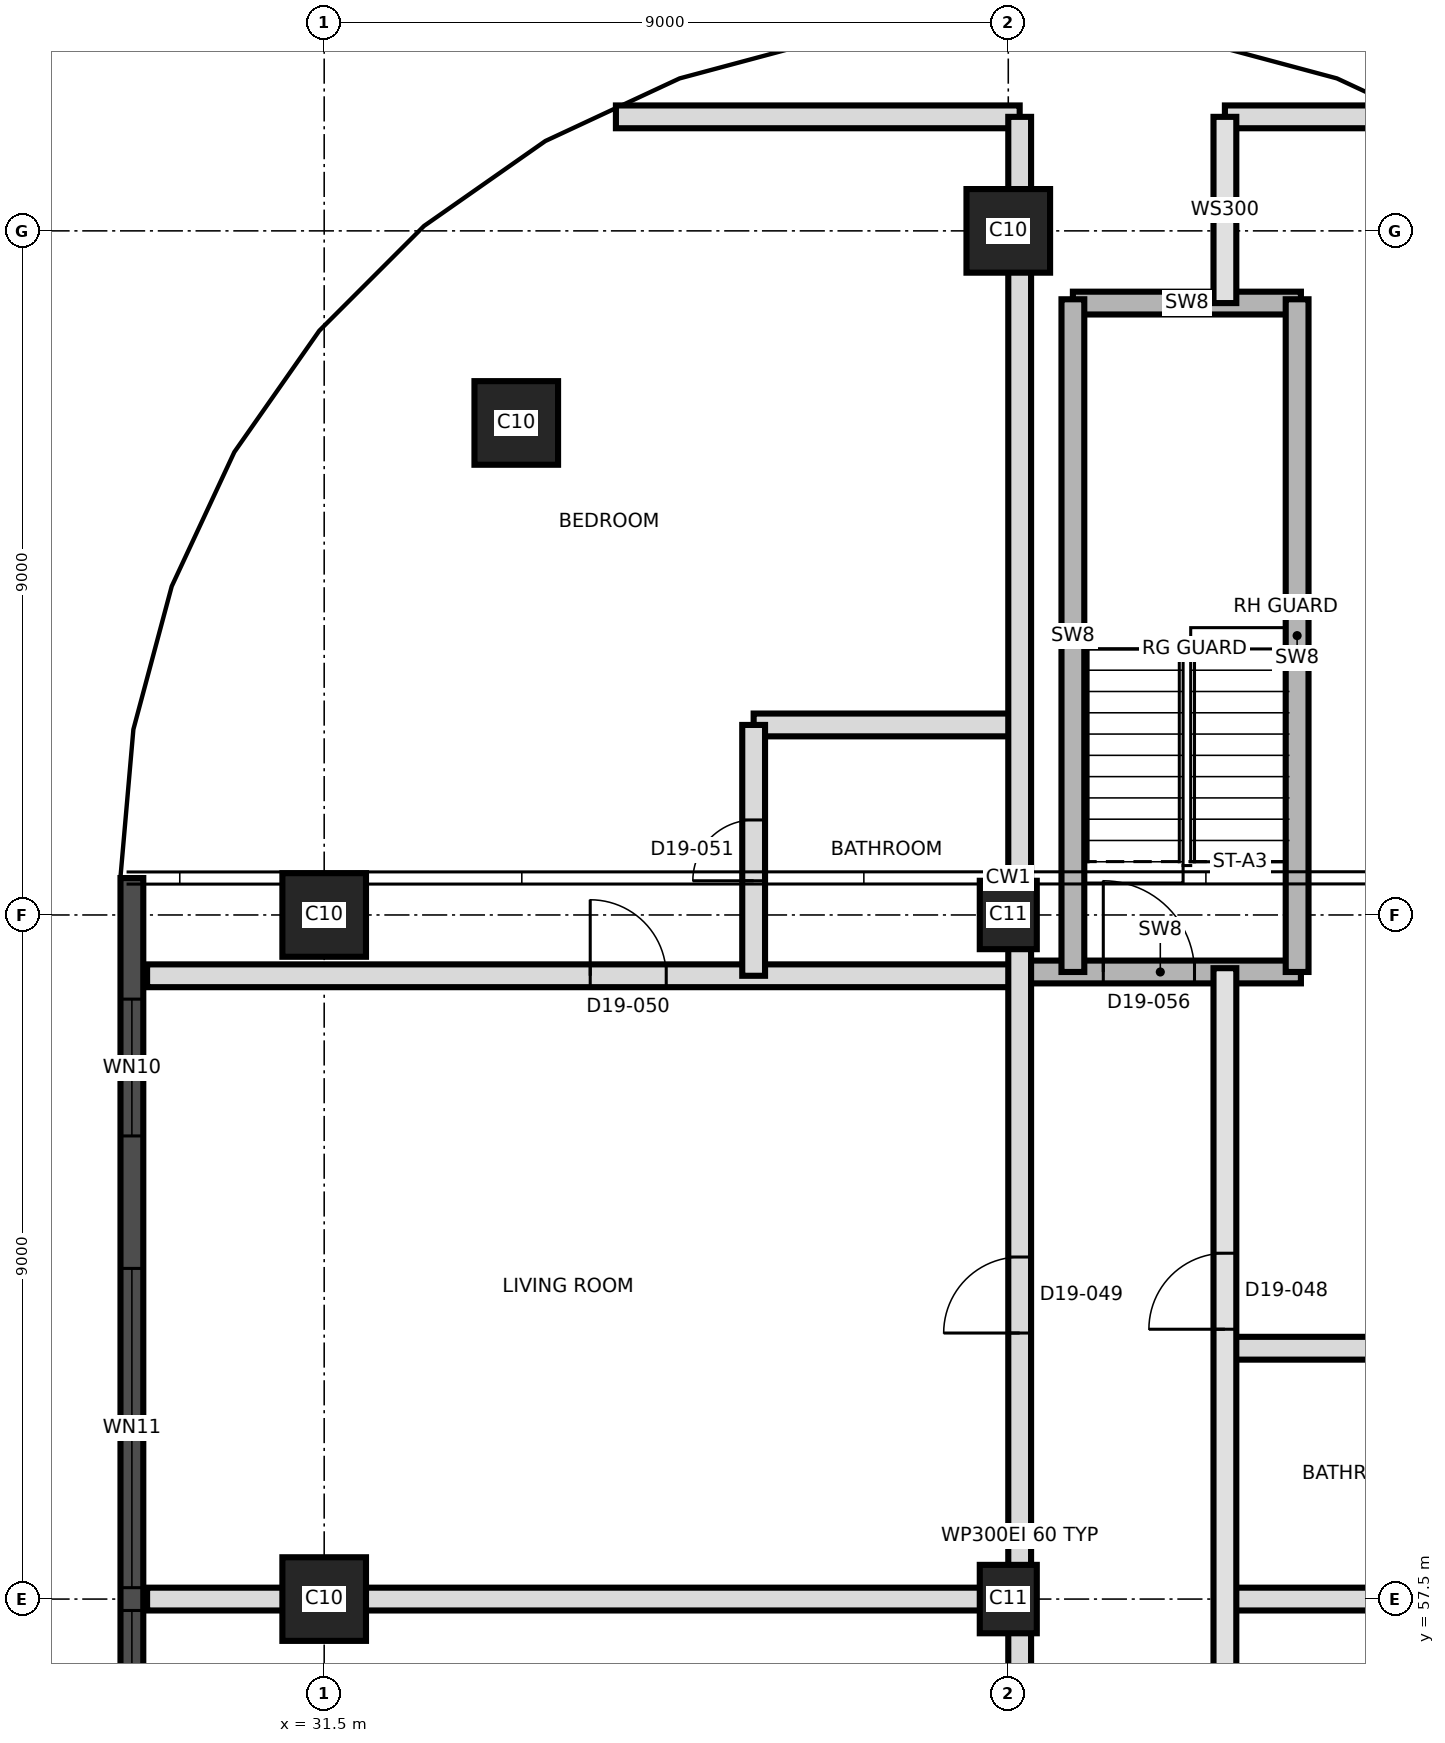
"""IFC4 building model, lengths in metres.
Left out: names, types, materials, properties, quantities, classifications, styles, units other than length and angle.
Written with IfcOpenShell. Run it as: python <this file> out.ifc"""

import sys

from ifc_helpers import new_model, si_unit, direction, frame, frame_2d, origin, origin_2d, place, context, subcontext, project, spatial, rectangle, extrude, element, fill, save


model = new_model("IFC4")
c1 = context("Model", 3, precision=1e-05, world=origin(), true_north=direction((0.0, 1.0)))
c2 = subcontext(c1, "Body", "Model", "MODEL_VIEW")
j1 = project(units=[si_unit("LENGTHUNIT", "METRE"), si_unit("PLANEANGLEUNIT", "RADIAN")], contexts=[c1])
p1 = place(None, origin())
s1 = spatial("IfcSite", under=j1, at=p1, CompositionType="ELEMENT")
p2 = place(p1, origin())
s2 = spatial("IfcBuilding", under=s1, at=p2, CompositionType="ELEMENT")
p3 = place(p2, frame((0.0, 0.0, 179.2)))
s3 = spatial("IfcBuildingStorey", under=s2, at=p3, CompositionType="ELEMENT", Elevation=179.2)
p4 = place(p3, frame((31.5, 57.5, 0.0), z_axis=(0.0, 0.0, 1.0), x_axis=(1.0, 0.0, 0.0)))
e1 = element("IfcColumn", 1, at=p4, inside=s3, PredefinedType="COLUMN", context=c2, shape_type="SweptSolid", body=[
    extrude(rectangle(XDim=1.1, YDim=1.1, at=origin_2d()), origin(), (0.0, 0.0, 1.0), 3.7),
])
p5 = place(p3, frame((40.5, 57.5, 0.0), z_axis=(0.0, 0.0, 1.0), x_axis=(0.0, 1.0, 0.0)))
e2 = element("IfcColumn", 2, at=p5, inside=s3, PredefinedType="COLUMN", context=c2, shape_type="SweptSolid", body=[
    extrude(rectangle(XDim=0.9, YDim=0.75, at=origin_2d()), origin(), (0.0, 0.0, 1.0), 3.7),
])
p6 = place(p3, frame((31.5, 66.5, 0.0), z_axis=(0.0, 0.0, 1.0), x_axis=(1.0, 0.0, 0.0)))
e3 = element("IfcColumn", 3, at=p6, inside=s3, PredefinedType="COLUMN", context=c2, shape_type="SweptSolid", body=[
    extrude(rectangle(XDim=1.1, YDim=1.1, at=origin_2d()), origin(), (0.0, 0.0, 1.0), 3.7),
])
p7 = place(p3, frame((40.5, 66.5, 0.0), z_axis=(0.0, 0.0, 1.0), x_axis=(0.0, 1.0, 0.0)))
e4 = element("IfcColumn", 4, at=p7, inside=s3, PredefinedType="COLUMN", context=c2, shape_type="SweptSolid", body=[
    extrude(rectangle(XDim=0.9, YDim=0.75, at=origin_2d()), origin(), (0.0, 0.0, 1.0), 3.7),
])
for number, where, z_axis, x_axis in (
    (5, (34.027, 72.973, 0.0), (0.0, 0.0, 1.0), (1.0, 0.0, 0.0)),
    (6, (40.5, 75.5, 0.0), (0.0, 0.0, 1.0), (1.0, 0.0, 0.0)),
):
    element("IfcColumn", number, at=place(p3, frame(where, z_axis=z_axis, x_axis=x_axis)), inside=s3, PredefinedType="COLUMN", context=c2, shape_type="SweptSolid", body=[
        extrude(rectangle(XDim=1.1, YDim=1.1, at=origin_2d()), origin(), (0.0, 0.0, 1.0), 3.7),
    ])
p8 = place(p3, frame((28.97, 66.986, 0.0), z_axis=(0.0, 0.0, 1.0), x_axis=(0.0, -1.0, 0.0)))
e7 = element("IfcWall", 7, at=p8, inside=s3, PredefinedType="SOLIDWALL", context=c2, shape_type="SweptSolid", body=[
    extrude(rectangle(XDim=32.976, YDim=0.3, at=frame_2d((16.488, 0.0))), origin(), (0.0, 0.0, 1.0), 3.4),
])
p9 = place(p8, frame((1.593, 0.0, 0.3)))
e8 = element("IfcOpeningElement", 8, at=p9, cuts=e7, PredefinedType="OPENING", context=c2, shape_type="SweptSolid", body=[
    extrude(rectangle(XDim=1.8, YDim=2.4, at=frame_2d((0.9, 1.2))), frame((0.0, 0.16, 0.0), z_axis=(0.0, -1.0, 0.0), x_axis=(1.0, 0.0, 0.0)), (0.0, 0.0, 1.0), 0.32),
])
p10 = place(p8, frame((5.136, 0.0, 0.9)))
e9 = element("IfcOpeningElement", 9, at=p10, cuts=e7, PredefinedType="OPENING", context=c2, shape_type="SweptSolid", body=[
    extrude(rectangle(XDim=4.2, YDim=1.5, at=frame_2d((2.1, 0.75))), frame((0.0, 0.16, 0.0), z_axis=(0.0, -1.0, 0.0), x_axis=(1.0, 0.0, 0.0)), (0.0, 0.0, 1.0), 0.32),
])
p11 = place(p8, frame((9.636, 0.0, 0.9)))
e10 = element("IfcOpeningElement", 10, at=p11, cuts=e7, PredefinedType="OPENING", context=c2, shape_type="SweptSolid", body=[
    extrude(rectangle(XDim=4.2, YDim=1.5, at=frame_2d((2.1, 0.75))), frame((0.0, 0.16, 0.0), z_axis=(0.0, -1.0, 0.0), x_axis=(1.0, 0.0, 0.0)), (0.0, 0.0, 1.0), 0.32),
])
p12 = place(p8, frame((14.136, 0.0, 0.9)))
e11 = element("IfcOpeningElement", 11, at=p12, cuts=e7, PredefinedType="OPENING", context=c2, shape_type="SweptSolid", body=[
    extrude(rectangle(XDim=4.2, YDim=1.5, at=frame_2d((2.1, 0.75))), frame((0.0, 0.16, 0.0), z_axis=(0.0, -1.0, 0.0), x_axis=(1.0, 0.0, 0.0)), (0.0, 0.0, 1.0), 0.32),
])
p13 = place(p8, frame((18.636, 0.0, 0.9)))
e12 = element("IfcOpeningElement", 12, at=p13, cuts=e7, PredefinedType="OPENING", context=c2, shape_type="SweptSolid", body=[
    extrude(rectangle(XDim=4.2, YDim=1.5, at=frame_2d((2.1, 0.75))), frame((0.0, 0.16, 0.0), z_axis=(0.0, -1.0, 0.0), x_axis=(1.0, 0.0, 0.0)), (0.0, 0.0, 1.0), 0.32),
])
p14 = place(p8, frame((23.136, 0.0, 0.9)))
e13 = element("IfcOpeningElement", 13, at=p14, cuts=e7, PredefinedType="OPENING", context=c2, shape_type="SweptSolid", body=[
    extrude(rectangle(XDim=4.2, YDim=1.5, at=frame_2d((2.1, 0.75))), frame((0.0, 0.16, 0.0), z_axis=(0.0, -1.0, 0.0), x_axis=(1.0, 0.0, 0.0)), (0.0, 0.0, 1.0), 0.32),
])
p15 = place(p8, frame((29.331, 0.0, 0.3)))
e14 = element("IfcOpeningElement", 14, at=p15, cuts=e7, PredefinedType="OPENING", context=c2, shape_type="SweptSolid", body=[
    extrude(rectangle(XDim=1.8, YDim=2.4, at=frame_2d((0.9, 1.2))), frame((0.0, 0.16, 0.0), z_axis=(0.0, -1.0, 0.0), x_axis=(1.0, 0.0, 0.0)), (0.0, 0.0, 1.0), 0.32),
])
p16 = place(p3, frame((29.17, 57.5, 0.0), z_axis=(0.0, 0.0, 1.0), x_axis=(1.0, 0.0, 0.0)))
e15 = element("IfcWall", 15, at=p16, inside=s3, PredefinedType="PARTITIONING", context=c2, shape_type="SweptSolid", body=[
    extrude(rectangle(XDim=11.48, YDim=0.3, at=frame_2d((5.74, 0.0))), origin(), (0.0, 0.0, 1.0), 3.4),
])
p17 = place(p3, frame((43.35, 57.5, 0.0), z_axis=(0.0, 0.0, 1.0), x_axis=(1.0, 0.0, 0.0)))
e16 = element("IfcWall", 16, at=p17, inside=s3, PredefinedType="PARTITIONING", context=c2, shape_type="SweptSolid", body=[
    extrude(rectangle(XDim=8.66, YDim=0.3, at=frame_2d((4.33, 0.0))), origin(), (0.0, 0.0, 1.0), 3.4),
])
p18 = place(p3, frame((43.35, 60.8, 0.0), z_axis=(0.0, 0.0, 1.0), x_axis=(1.0, 0.0, 0.0)))
e17 = element("IfcWall", 17, at=p18, inside=s3, PredefinedType="PARTITIONING", context=c2, shape_type="SweptSolid", body=[
    extrude(rectangle(XDim=3.5, YDim=0.3, at=frame_2d((1.75, 0.0))), origin(), (0.0, 0.0, 1.0), 3.4),
])
p19 = place(p3, frame((29.17, 65.7, 0.0), z_axis=(0.0, 0.0, 1.0), x_axis=(1.0, 0.0, 0.0)))
e18 = element("IfcWall", 18, at=p19, inside=s3, PredefinedType="PARTITIONING", context=c2, shape_type="SweptSolid", body=[
    extrude(rectangle(XDim=11.48, YDim=0.3, at=frame_2d((5.74, 0.0))), origin(), (0.0, 0.0, 1.0), 3.4),
])
p20 = place(p19, frame((5.83, 0.0, 0.0)))
e19 = element("IfcOpeningElement", 19, at=p20, cuts=e18, PredefinedType="OPENING", context=c2, shape_type="SweptSolid", body=[
    extrude(rectangle(XDim=1.0, YDim=2.1, at=frame_2d((0.5, 1.05))), frame((0.0, 0.16, 0.0), z_axis=(0.0, -1.0, 0.0), x_axis=(1.0, 0.0, 0.0)), (0.0, 0.0, 1.0), 0.32),
])
p21 = place(p3, frame((40.65, 65.75, 0.0), z_axis=(0.0, 0.0, 1.0), x_axis=(1.0, 0.0, 0.0)))
e20 = element("IfcWall", 20, at=p21, inside=s3, PredefinedType="SHEAR", context=c2, shape_type="SweptSolid", body=[
    extrude(rectangle(XDim=3.7, YDim=0.3, at=frame_2d((1.85, 0.0))), origin(), (0.0, 0.0, 1.0), 3.4),
])
p22 = place(p21, frame((1.1, 0.0, 0.0)))
e21 = element("IfcOpeningElement", 21, at=p22, cuts=e20, PredefinedType="OPENING", context=c2, shape_type="SweptSolid", body=[
    extrude(rectangle(XDim=1.2, YDim=2.1, at=frame_2d((0.6, 1.05))), frame((0.0, 0.16, 0.0), z_axis=(0.0, -1.0, 0.0), x_axis=(1.0, 0.0, 0.0)), (0.0, 0.0, 1.0), 0.32),
])
p23 = place(p3, frame((37.15, 69.0, 0.0), z_axis=(0.0, 0.0, 1.0), x_axis=(1.0, 0.0, 0.0)))
e22 = element("IfcWall", 22, at=p23, inside=s3, PredefinedType="PARTITIONING", context=c2, shape_type="SweptSolid", body=[
    extrude(rectangle(XDim=3.5, YDim=0.3, at=frame_2d((1.75, 0.0))), origin(), (0.0, 0.0, 1.0), 3.4),
])
p24 = place(p3, frame((41.35, 74.55, 0.0), z_axis=(0.0, 0.0, 1.0), x_axis=(1.0, 0.0, 0.0)))
e23 = element("IfcWall", 23, at=p24, inside=s3, PredefinedType="SHEAR", context=c2, shape_type="SweptSolid", body=[
    extrude(rectangle(XDim=3.0, YDim=0.3, at=frame_2d((1.5, 0.0))), origin(), (0.0, 0.0, 1.0), 3.4),
])
p25 = place(p3, frame((35.338, 77.0, 0.0), z_axis=(0.0, 0.0, 1.0), x_axis=(1.0, 0.0, 0.0)))
e24 = element("IfcWall", 24, at=p25, inside=s3, PredefinedType="PARTITIONING", context=c2, shape_type="SweptSolid", body=[
    extrude(rectangle(XDim=5.312, YDim=0.3, at=frame_2d((2.656, 0.0))), origin(), (0.0, 0.0, 1.0), 3.4),
])
p26 = place(p3, frame((43.35, 77.0, 0.0), z_axis=(0.0, 0.0, 1.0), x_axis=(1.0, 0.0, 0.0)))
e25 = element("IfcWall", 25, at=p26, inside=s3, PredefinedType="PARTITIONING", context=c2, shape_type="SweptSolid", body=[
    extrude(rectangle(XDim=2.312, YDim=0.3, at=frame_2d((1.156, 0.0))), origin(), (0.0, 0.0, 1.0), 3.4),
])
p27 = place(p3, frame((37.15, 65.7, 0.0), z_axis=(0.0, 0.0, 1.0), x_axis=(0.0, 1.0, 0.0)))
e26 = element("IfcWall", 26, at=p27, inside=s3, PredefinedType="PARTITIONING", context=c2, shape_type="SweptSolid", body=[
    extrude(rectangle(XDim=3.3, YDim=0.3, at=frame_2d((1.65, 0.0))), origin(), (0.0, 0.0, 1.0), 3.4),
])
p28 = place(p27, frame((1.25, 0.0, 0.0)))
e27 = element("IfcOpeningElement", 27, at=p28, cuts=e26, PredefinedType="OPENING", context=c2, shape_type="SweptSolid", body=[
    extrude(rectangle(XDim=0.8, YDim=2.1, at=frame_2d((0.4, 1.05))), frame((0.0, 0.16, 0.0), z_axis=(0.0, -1.0, 0.0), x_axis=(1.0, 0.0, 0.0)), (0.0, 0.0, 1.0), 0.32),
])
p29 = place(p3, frame((40.65, 39.65, 0.0), z_axis=(0.0, 0.0, 1.0), x_axis=(0.0, 1.0, 0.0)))
e28 = element("IfcWall", 28, at=p29, inside=s3, PredefinedType="PARTITIONING", context=c2, shape_type="SweptSolid", body=[
    extrude(rectangle(XDim=37.35, YDim=0.3, at=frame_2d((18.675, 0.0))), origin(), (0.0, 0.0, 1.0), 3.4),
])
p30 = place(p29, frame((0.88, 0.0, 0.0)))
e29 = element("IfcOpeningElement", 29, at=p30, cuts=e28, PredefinedType="OPENING", context=c2, shape_type="SweptSolid", body=[
    extrude(rectangle(XDim=1.0, YDim=2.1, at=frame_2d((0.5, 1.05))), frame((0.0, 0.16, 0.0), z_axis=(0.0, -1.0, 0.0), x_axis=(1.0, 0.0, 0.0)), (0.0, 0.0, 1.0), 0.32),
])
p31 = place(p29, frame((6.73, 0.0, 0.0)))
e30 = element("IfcOpeningElement", 30, at=p31, cuts=e28, PredefinedType="OPENING", context=c2, shape_type="SweptSolid", body=[
    extrude(rectangle(XDim=1.0, YDim=2.1, at=frame_2d((0.5, 1.05))), frame((0.0, 0.16, 0.0), z_axis=(0.0, -1.0, 0.0), x_axis=(1.0, 0.0, 0.0)), (0.0, 0.0, 1.0), 0.32),
])
p32 = place(p29, frame((12.265, 0.0, 0.0)))
e31 = element("IfcOpeningElement", 31, at=p32, cuts=e28, PredefinedType="OPENING", context=c2, shape_type="SweptSolid", body=[
    extrude(rectangle(XDim=1.0, YDim=2.1, at=frame_2d((0.5, 1.05))), frame((0.0, 0.16, 0.0), z_axis=(0.0, -1.0, 0.0), x_axis=(1.0, 0.0, 0.0)), (0.0, 0.0, 1.0), 0.32),
])
p33 = place(p29, frame((15.215, 0.0, 0.0)))
e32 = element("IfcOpeningElement", 32, at=p33, cuts=e28, PredefinedType="OPENING", context=c2, shape_type="SweptSolid", body=[
    extrude(rectangle(XDim=1.4, YDim=2.1, at=frame_2d((0.7, 1.05))), frame((0.0, 0.16, 0.0), z_axis=(0.0, -1.0, 0.0), x_axis=(1.0, 0.0, 0.0)), (0.0, 0.0, 1.0), 0.32),
])
p34 = place(p29, frame((21.35, 0.0, 0.0)))
e33 = element("IfcOpeningElement", 33, at=p34, cuts=e28, PredefinedType="OPENING", context=c2, shape_type="SweptSolid", body=[
    extrude(rectangle(XDim=1.0, YDim=2.4, at=frame_2d((0.5, 1.2))), frame((0.0, 0.16, 0.0), z_axis=(0.0, -1.0, 0.0), x_axis=(1.0, 0.0, 0.0)), (0.0, 0.0, 1.0), 0.32),
])
p35 = place(p3, frame((41.35, 65.75, 0.0), z_axis=(0.0, 0.0, 1.0), x_axis=(0.0, 1.0, 0.0)))
e34 = element("IfcWall", 34, at=p35, inside=s3, PredefinedType="SHEAR", context=c2, shape_type="SweptSolid", body=[
    extrude(rectangle(XDim=8.85, YDim=0.3, at=frame_2d((4.425, 0.0))), origin(), (0.0, 0.0, 1.0), 3.4),
])
p36 = place(p3, frame((43.35, 39.65, 0.0), z_axis=(0.0, 0.0, 1.0), x_axis=(0.0, 1.0, 0.0)))
e35 = element("IfcWall", 35, at=p36, inside=s3, PredefinedType="SOLIDWALL", context=c2, shape_type="SweptSolid", body=[
    extrude(rectangle(XDim=26.15, YDim=0.3, at=frame_2d((13.075, 0.0))), origin(), (0.0, 0.0, 1.0), 3.4),
])
p37 = place(p36, frame((3.265, 0.0, 0.0)))
e36 = element("IfcOpeningElement", 36, at=p37, cuts=e35, PredefinedType="OPENING", context=c2, shape_type="SweptSolid", body=[
    extrude(rectangle(XDim=1.0, YDim=2.1, at=frame_2d((0.5, 1.05))), frame((0.0, 0.16, 0.0), z_axis=(0.0, -1.0, 0.0), x_axis=(1.0, 0.0, 0.0)), (0.0, 0.0, 1.0), 0.32),
])
p38 = place(p36, frame((6.215, 0.0, 0.0)))
e37 = element("IfcOpeningElement", 37, at=p38, cuts=e35, PredefinedType="OPENING", context=c2, shape_type="SweptSolid", body=[
    extrude(rectangle(XDim=1.4, YDim=2.1, at=frame_2d((0.7, 1.05))), frame((0.0, 0.16, 0.0), z_axis=(0.0, -1.0, 0.0), x_axis=(1.0, 0.0, 0.0)), (0.0, 0.0, 1.0), 0.32),
])
p39 = place(p36, frame((9.985, 0.0, 0.0)))
e38 = element("IfcOpeningElement", 38, at=p39, cuts=e35, PredefinedType="OPENING", context=c2, shape_type="SweptSolid", body=[
    extrude(rectangle(XDim=1.2, YDim=2.1, at=frame_2d((0.6, 1.05))), frame((0.0, 0.16, 0.0), z_axis=(0.0, -1.0, 0.0), x_axis=(1.0, 0.0, 0.0)), (0.0, 0.0, 1.0), 0.32),
])
p40 = place(p36, frame((13.235, 0.0, 0.0)))
e39 = element("IfcOpeningElement", 39, at=p40, cuts=e35, PredefinedType="OPENING", context=c2, shape_type="SweptSolid", body=[
    extrude(rectangle(XDim=1.0, YDim=2.1, at=frame_2d((0.5, 1.05))), frame((0.0, 0.16, 0.0), z_axis=(0.0, -1.0, 0.0), x_axis=(1.0, 0.0, 0.0)), (0.0, 0.0, 1.0), 0.32),
])
p41 = place(p36, frame((21.4, 0.0, 0.0)))
e40 = element("IfcOpeningElement", 40, at=p41, cuts=e35, PredefinedType="OPENING", context=c2, shape_type="SweptSolid", body=[
    extrude(rectangle(XDim=1.0, YDim=2.4, at=frame_2d((0.5, 1.2))), frame((0.0, 0.16, 0.0), z_axis=(0.0, -1.0, 0.0), x_axis=(1.0, 0.0, 0.0)), (0.0, 0.0, 1.0), 0.32),
])
p42 = place(p3, frame((43.35, 74.55, 0.0), z_axis=(0.0, 0.0, 1.0), x_axis=(0.0, 1.0, 0.0)))
e41 = element("IfcWall", 41, at=p42, inside=s3, PredefinedType="SOLIDWALL", context=c2, shape_type="SweptSolid", body=[
    extrude(rectangle(XDim=2.45, YDim=0.3, at=frame_2d((1.225, 0.0))), origin(), (0.0, 0.0, 1.0), 3.4),
])
p43 = place(p3, frame((44.3, 65.75, 0.0), z_axis=(0.0, 0.0, 1.0), x_axis=(0.0, 1.0, 0.0)))
e42 = element("IfcWall", 42, at=p43, inside=s3, PredefinedType="SHEAR", context=c2, shape_type="SweptSolid", body=[
    extrude(rectangle(XDim=8.85, YDim=0.3, at=frame_2d((4.425, 0.0))), origin(), (0.0, 0.0, 1.0), 3.4),
])
p44 = place(p9, origin())
e43 = element("IfcWindow", 43, at=p44, inside=s3, PartitioningType="SINGLE_PANEL", PredefinedType="WINDOW", context=c2, shape_type="SweptSolid", body=[
    extrude(rectangle(XDim=1.8, YDim=2.4, at=frame_2d((0.9, 1.2))), frame((0.0, 0.03, 0.0), z_axis=(0.0, -1.0, 0.0), x_axis=(1.0, 0.0, 0.0)), (0.0, 0.0, 1.0), 0.06),
])
fill(e8, e43)
p45 = place(p10, origin())
e44 = element("IfcWindow", 44, at=p45, inside=s3, PartitioningType="SINGLE_PANEL", PredefinedType="WINDOW", context=c2, shape_type="SweptSolid", body=[
    extrude(rectangle(XDim=4.2, YDim=1.5, at=frame_2d((2.1, 0.75))), frame((0.0, 0.03, 0.0), z_axis=(0.0, -1.0, 0.0), x_axis=(1.0, 0.0, 0.0)), (0.0, 0.0, 1.0), 0.06),
])
fill(e9, e44)
p46 = place(p11, origin())
e45 = element("IfcWindow", 45, at=p46, inside=s3, PartitioningType="SINGLE_PANEL", PredefinedType="WINDOW", context=c2, shape_type="SweptSolid", body=[
    extrude(rectangle(XDim=4.2, YDim=1.5, at=frame_2d((2.1, 0.75))), frame((0.0, 0.03, 0.0), z_axis=(0.0, -1.0, 0.0), x_axis=(1.0, 0.0, 0.0)), (0.0, 0.0, 1.0), 0.06),
])
fill(e10, e45)
p47 = place(p41, origin())
e46 = element("IfcDoor", 46, at=p47, inside=s3, OperationType="SINGLE_SWING_RIGHT", PredefinedType="DOOR", context=c2, shape_type="SweptSolid", body=[
    extrude(rectangle(XDim=1.0, YDim=2.4, at=frame_2d((0.5, 1.2))), frame((0.0, 0.025, 0.0), z_axis=(0.0, -1.0, 0.0), x_axis=(1.0, 0.0, 0.0)), (0.0, 0.0, 1.0), 0.05),
])
fill(e40, e46)
p48 = place(p34, origin())
e47 = element("IfcDoor", 47, at=p48, inside=s3, OperationType="SINGLE_SWING_LEFT", PredefinedType="DOOR", context=c2, shape_type="SweptSolid", body=[
    extrude(rectangle(XDim=1.0, YDim=2.4, at=frame_2d((0.5, 1.2))), frame((0.0, 0.025, 0.0), z_axis=(0.0, -1.0, 0.0), x_axis=(1.0, 0.0, 0.0)), (0.0, 0.0, 1.0), 0.05),
])
fill(e33, e47)
p49 = place(p20, origin())
e48 = element("IfcDoor", 48, at=p49, inside=s3, OperationType="SINGLE_SWING_RIGHT", PredefinedType="DOOR", context=c2, shape_type="SweptSolid", body=[
    extrude(rectangle(XDim=1.0, YDim=2.1, at=frame_2d((0.5, 1.05))), frame((0.0, 0.025, 0.0), z_axis=(0.0, -1.0, 0.0), x_axis=(1.0, 0.0, 0.0)), (0.0, 0.0, 1.0), 0.05),
])
fill(e19, e48)
p50 = place(p28, origin())
e49 = element("IfcDoor", 49, at=p50, inside=s3, OperationType="SINGLE_SWING_LEFT", PredefinedType="DOOR", context=c2, shape_type="SweptSolid", body=[
    extrude(rectangle(XDim=0.8, YDim=2.1, at=frame_2d((0.4, 1.05))), frame((0.0, 0.025, 0.0), z_axis=(0.0, -1.0, 0.0), x_axis=(1.0, 0.0, 0.0)), (0.0, 0.0, 1.0), 0.05),
])
fill(e27, e49)
p51 = place(p22, origin())
e50 = element("IfcDoor", 50, at=p51, inside=s3, OperationType="SINGLE_SWING_RIGHT", PredefinedType="DOOR", context=c2, shape_type="SweptSolid", body=[
    extrude(rectangle(XDim=1.2, YDim=2.1, at=frame_2d((0.6, 1.05))), frame((0.0, 0.025, 0.0), z_axis=(0.0, -1.0, 0.0), x_axis=(1.0, 0.0, 0.0)), (0.0, 0.0, 1.0), 0.05),
])
fill(e21, e50)
save(model, sys.argv[1])
